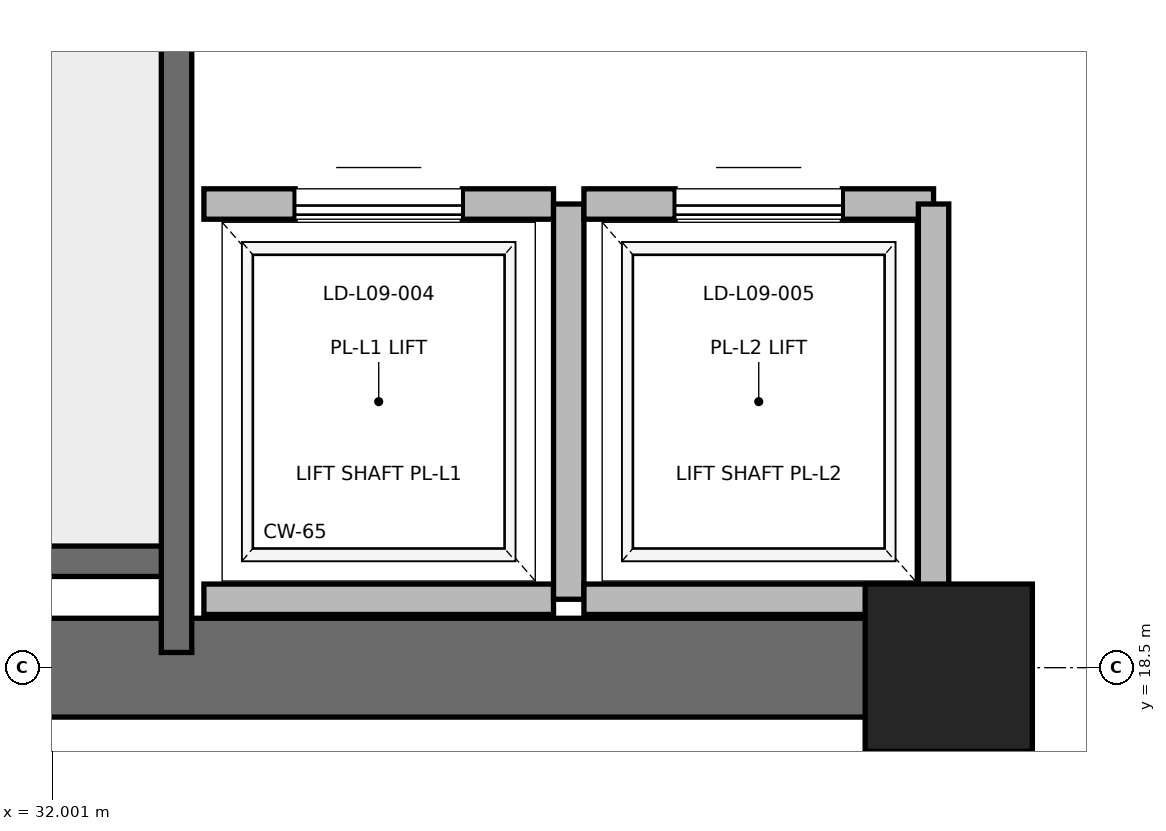
"""IFC4 building model, lengths in metres.
Left out: names, types, materials, properties, quantities, classifications, styles, units other than length and angle.
Written with IfcOpenShell. Run it as: python <this file> out.ifc"""

import sys

from ifc_helpers import new_model, si_unit, direction, frame, frame_2d, origin, origin_2d, place, context, subcontext, project, spatial, rectangle, extrude, element, fill, save


model = new_model("IFC4")
c1 = context("Model", 3, precision=1e-05, world=origin(), true_north=direction((0.0, 1.0)))
c2 = subcontext(c1, "Body", "Model", "MODEL_VIEW")
j1 = project(units=[si_unit("LENGTHUNIT", "METRE"), si_unit("PLANEANGLEUNIT", "RADIAN")], contexts=[c1])
p1 = place(None, origin())
s1 = spatial("IfcSite", under=j1, at=p1, CompositionType="ELEMENT")
p2 = place(p1, origin())
s2 = spatial("IfcBuilding", under=s1, at=p2, CompositionType="ELEMENT")
p3 = place(p2, frame((0.0, 0.0, 43.6)))
s3 = spatial("IfcBuildingStorey", under=s2, at=p3, CompositionType="ELEMENT", Elevation=43.6)
p4 = place(p3, frame((37.9, 18.5, 0.0), z_axis=(0.0, 0.0, 1.0), x_axis=(1.0, 0.0, 0.0)))
e1 = element("IfcColumn", 1, at=p4, inside=s3, PredefinedType="PILASTER", context=c2, shape_type="SweptSolid", body=[
    extrude(rectangle(XDim=1.1, YDim=1.1, at=origin_2d()), origin(), (0.0, 0.0, 1.0), 4.0),
])
p5 = place(p3, frame((29.0, 18.5, 0.0), z_axis=(0.0, 0.0, 1.0), x_axis=(1.0, 0.0, 0.0)))
e2 = element("IfcWall", 2, at=p5, inside=s3, PredefinedType="SHEAR", context=c2, shape_type="SweptSolid", body=[
    extrude(rectangle(XDim=9.2, YDim=0.65, at=frame_2d((4.6, 0.0))), origin(), (0.0, 0.0, 1.0), 3.76),
])
p6 = place(p3, frame((29.7, 19.2, 0.0), z_axis=(0.0, 0.0, 1.0), x_axis=(1.0, 0.0, 0.0)))
e3 = element("IfcWall", 3, at=p6, inside=s3, PredefinedType="SOLIDWALL", context=c2, shape_type="SweptSolid", body=[
    extrude(rectangle(XDim=3.12, YDim=0.2, at=frame_2d((1.56, 0.0))), origin(), (0.0, 0.0, 1.0), 3.76),
])
p7 = place(p3, frame((32.82, 18.6, 0.0), z_axis=(0.0, 0.0, 1.0), x_axis=(0.0, 1.0, 0.0)))
e4 = element("IfcWall", 4, at=p7, inside=s3, PredefinedType="SOLIDWALL", context=c2, shape_type="SweptSolid", body=[
    extrude(rectangle(XDim=8.78, YDim=0.2, at=frame_2d((4.39, 0.0))), origin(), (0.0, 0.0, 1.0), 3.76),
])
p8 = place(p3, frame((33.0, 18.95, 0.0), z_axis=(0.0, 0.0, 1.0), x_axis=(1.0, 0.0, 0.0)))
e5 = element("IfcWall", 5, at=p8, inside=s3, PredefinedType="SOLIDWALL", context=c2, shape_type="SweptSolid", body=[
    extrude(rectangle(XDim=2.3, YDim=0.2, at=frame_2d((1.15, 0.0))), origin(), (0.0, 0.0, 1.0), 3.76),
])
p9 = place(p3, frame((35.3, 21.55, 0.0), z_axis=(0.0, 0.0, 1.0), x_axis=(-1.0, 0.0, 0.0)))
e6 = element("IfcWall", 6, at=p9, inside=s3, PredefinedType="SOLIDWALL", context=c2, shape_type="SweptSolid", body=[
    extrude(rectangle(XDim=2.3, YDim=0.2, at=frame_2d((1.15, 0.0))), origin(), (0.0, 0.0, 1.0), 3.76),
])
p10 = place(p9, frame((0.6, 0.0, 0.0)))
e7 = element("IfcOpeningElement", 7, at=p10, cuts=e6, PredefinedType="OPENING", context=c2, shape_type="SweptSolid", body=[
    extrude(rectangle(XDim=1.1, YDim=2.2, at=frame_2d((0.55, 1.1))), frame((0.0, 0.1, 0.0), z_axis=(0.0, -1.0, 0.0), x_axis=(1.0, 0.0, 0.0)), (0.0, 0.0, 1.0), 0.2),
])
p11 = place(p3, frame((35.4, 18.95, 0.0), z_axis=(0.0, 0.0, 1.0), x_axis=(0.0, 1.0, 0.0)))
e8 = element("IfcWall", 8, at=p11, inside=s3, PredefinedType="SOLIDWALL", context=c2, shape_type="SweptSolid", body=[
    extrude(rectangle(XDim=2.6, YDim=0.2, at=frame_2d((1.3, 0.0))), origin(), (0.0, 0.0, 1.0), 3.76),
])
p12 = place(p3, frame((35.5, 18.95, 0.0), z_axis=(0.0, 0.0, 1.0), x_axis=(1.0, 0.0, 0.0)))
e9 = element("IfcWall", 9, at=p12, inside=s3, PredefinedType="SOLIDWALL", context=c2, shape_type="SweptSolid", body=[
    extrude(rectangle(XDim=2.3, YDim=0.2, at=frame_2d((1.15, 0.0))), origin(), (0.0, 0.0, 1.0), 2.54),
])
p13 = place(p3, frame((37.8, 21.55, 0.0), z_axis=(0.0, 0.0, 1.0), x_axis=(-1.0, 0.0, 0.0)))
e10 = element("IfcWall", 10, at=p13, inside=s3, PredefinedType="SOLIDWALL", context=c2, shape_type="SweptSolid", body=[
    extrude(rectangle(XDim=2.3, YDim=0.2, at=frame_2d((1.15, 0.0))), origin(), (0.0, 0.0, 1.0), 3.76),
])
p14 = place(p13, frame((0.6, 0.0, 0.0)))
e11 = element("IfcOpeningElement", 11, at=p14, cuts=e10, PredefinedType="OPENING", context=c2, shape_type="SweptSolid", body=[
    extrude(rectangle(XDim=1.1, YDim=2.2, at=frame_2d((0.55, 1.1))), frame((0.0, 0.1, 0.0), z_axis=(0.0, -1.0, 0.0), x_axis=(1.0, 0.0, 0.0)), (0.0, 0.0, 1.0), 0.2),
])
p15 = place(p3, frame((37.8, 18.95, 0.0), z_axis=(0.0, 0.0, 1.0), x_axis=(0.0, 1.0, 0.0)))
e12 = element("IfcWall", 12, at=p15, inside=s3, PredefinedType="SOLIDWALL", context=c2, shape_type="SweptSolid", body=[
    extrude(rectangle(XDim=2.6, YDim=0.2, at=frame_2d((1.3, 0.0))), origin(), (0.0, 0.0, 1.0), 2.54),
])
p16 = place(p10, origin())
e13 = element("IfcDoor", 13, at=p16, inside=s3, OperationType="SLIDING_TO_RIGHT", PredefinedType="DOOR", context=c2, shape_type="SweptSolid", body=[
    extrude(rectangle(XDim=1.1, YDim=2.2, at=frame_2d((0.55, 1.1))), frame((0.0, 0.025, 0.0), z_axis=(0.0, -1.0, 0.0), x_axis=(1.0, 0.0, 0.0)), (0.0, 0.0, 1.0), 0.05),
])
fill(e7, e13)
p17 = place(p14, origin())
e14 = element("IfcDoor", 14, at=p17, inside=s3, OperationType="SLIDING_TO_RIGHT", PredefinedType="DOOR", context=c2, shape_type="SweptSolid", body=[
    extrude(rectangle(XDim=1.1, YDim=2.2, at=frame_2d((0.55, 1.1))), frame((0.0, 0.025, 0.0), z_axis=(0.0, -1.0, 0.0), x_axis=(1.0, 0.0, 0.0)), (0.0, 0.0, 1.0), 0.05),
])
fill(e11, e14)
save(model, sys.argv[1])
